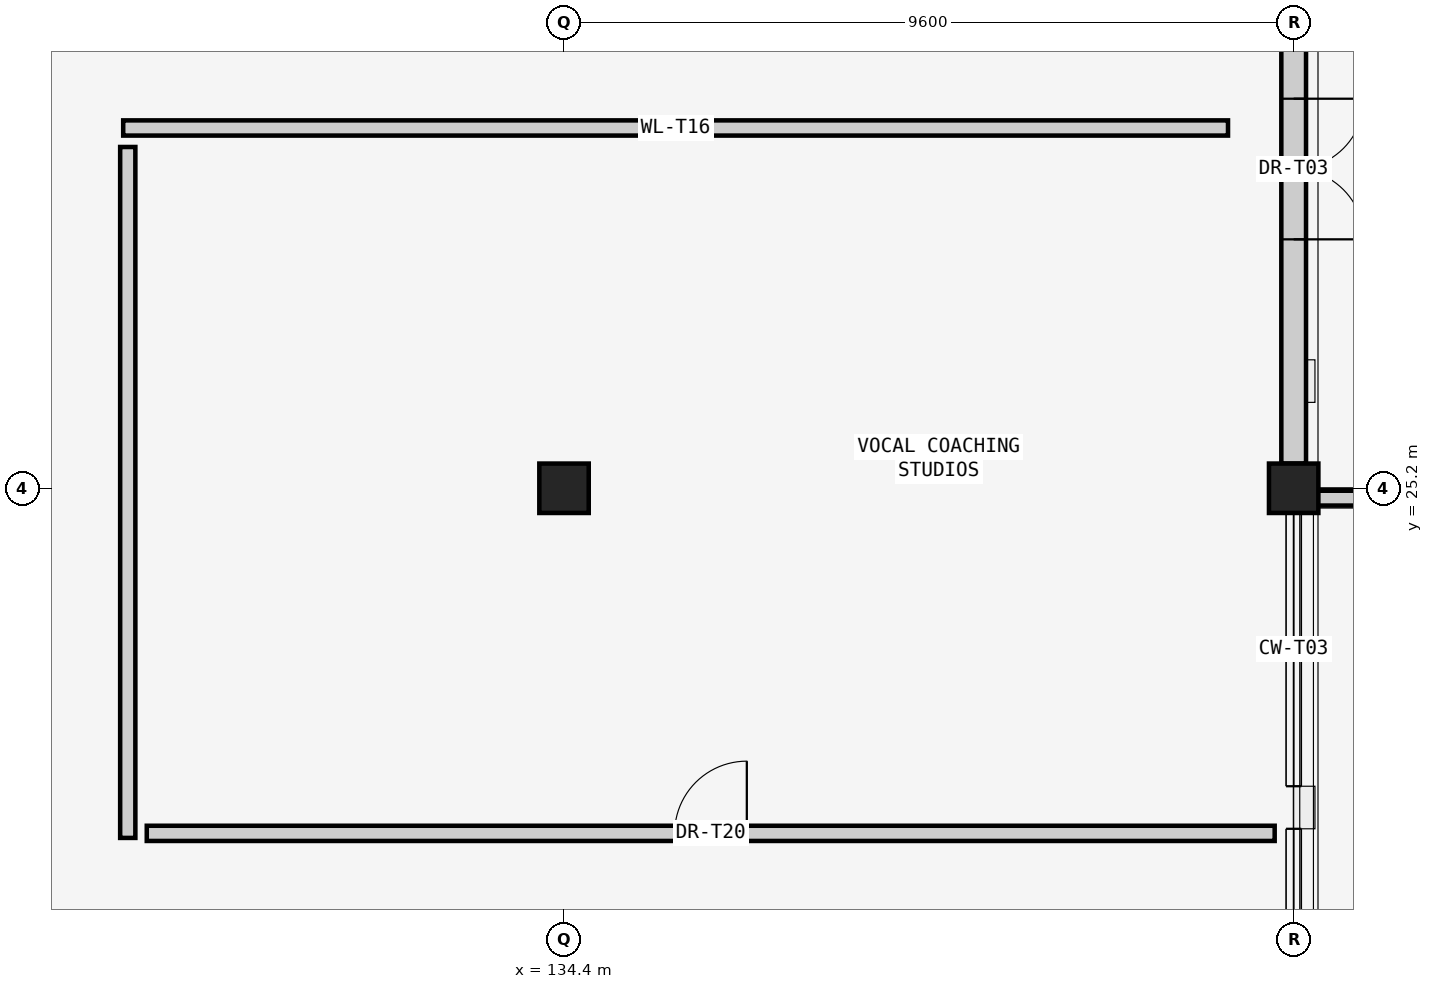
"""IFC4 building model, lengths in metres.
Left out: names, types, materials, properties, quantities, classifications, styles, units other than length and angle.
Written with IfcOpenShell. Run it as: python <this file> out.ifc"""

import sys

from ifc_helpers import new_model, si_unit, direction, frame, frame_2d, origin, origin_2d, place, context, subcontext, project, spatial, rectangle, extrude, element, fill, save


model = new_model("IFC4")
c1 = context("Model", 3, precision=1e-05, world=origin(), true_north=direction((0.0, 1.0)))
c2 = subcontext(c1, "Body", "Model", "MODEL_VIEW")
j1 = project(units=[si_unit("LENGTHUNIT", "METRE"), si_unit("PLANEANGLEUNIT", "RADIAN")], contexts=[c1])
p1 = place(None, origin())
s1 = spatial("IfcSite", under=j1, at=p1, CompositionType="ELEMENT")
p2 = place(p1, origin())
s2 = spatial("IfcBuilding", under=s1, at=p2, CompositionType="ELEMENT")
p3 = place(p2, frame((0.0, 0.0, 10.2)))
s3 = spatial("IfcBuildingStorey", under=s2, at=p3, CompositionType="ELEMENT", Elevation=10.2)
for number, where, z_axis, x_axis in (
    (1, (134.4, 25.2, 0.0), (0.0, 0.0, 1.0), (1.0, 0.0, 0.0)),
    (2, (144.0, 25.2, 0.0), (0.0, 0.0, 1.0), (1.0, 0.0, 0.0)),
):
    element("IfcColumn", number, at=place(p3, frame(where, z_axis=z_axis, x_axis=x_axis)), inside=s3, PredefinedType="COLUMN", context=c2, shape_type="SweptSolid", body=[
        extrude(rectangle(XDim=0.65, YDim=0.65, at=origin_2d()), origin(), (0.0, 0.0, 1.0), 4.53),
    ])
p4 = place(p3, frame((144.0, 33.275, 0.0), z_axis=(0.0, 0.0, 1.0), x_axis=(0.0, -1.0, 0.0)))
e3 = element("IfcWall", 3, at=p4, inside=s3, PredefinedType="SOLIDWALL", context=c2, shape_type="SweptSolid", body=[
    extrude(rectangle(XDim=7.75, YDim=0.325, at=frame_2d((3.875, 0.0))), origin(), (0.0, 0.0, 1.0), 4.178),
])
p5 = place(p4, frame((2.95, 0.0, 0.0)))
e4 = element("IfcOpeningElement", 4, at=p5, cuts=e3, PredefinedType="OPENING", context=c2, shape_type="SweptSolid", body=[
    extrude(rectangle(XDim=1.85, YDim=2.3, at=frame_2d((0.925, 1.15))), frame((0.0, 0.172, 0.0), z_axis=(0.0, -1.0, 0.0), x_axis=(1.0, 0.0, 0.0)), (0.0, 0.0, 1.0), 0.345),
])
p6 = place(p3, frame((144.16, 25.07, 0.0), z_axis=(0.0, 0.0, 1.0), x_axis=(1.0, 0.0, 0.0)))
e5 = element("IfcWall", 5, at=p6, inside=s3, PredefinedType="PARAPET", context=c2, shape_type="SweptSolid", body=[
    extrude(rectangle(XDim=9.28, YDim=0.195, at=frame_2d((4.64, 0.0))), origin(), (0.0, 0.0, 1.0), 1.15),
])
p7 = place(p3, frame((128.6, 29.94, 0.0), z_axis=(0.0, 0.0, 1.0), x_axis=(1.0, 0.0, 0.0)))
e6 = element("IfcWall", 6, at=p7, inside=s3, PredefinedType="SOLIDWALL", context=c2, shape_type="SweptSolid", body=[
    extrude(rectangle(XDim=14.536, YDim=0.2, at=frame_2d((7.268, 0.0))), origin(), (0.0, 0.0, 1.0), 4.48),
])
p8 = place(p3, frame((128.66, 20.6, 0.0), z_axis=(0.0, 0.0, 1.0), x_axis=(0.0, 1.0, 0.0)))
e7 = element("IfcWall", 7, at=p8, inside=s3, PredefinedType="SOLIDWALL", context=c2, shape_type="SweptSolid", body=[
    extrude(rectangle(XDim=9.09, YDim=0.2, at=frame_2d((4.545, 0.0))), origin(), (0.0, 0.0, 1.0), 4.48),
])
p9 = place(p3, frame((128.91, 20.66, 0.0), z_axis=(0.0, 0.0, 1.0), x_axis=(1.0, 0.0, 0.0)))
e8 = element("IfcWall", 8, at=p9, inside=s3, PredefinedType="SOLIDWALL", context=c2, shape_type="SweptSolid", body=[
    extrude(rectangle(XDim=14.84, YDim=0.2, at=frame_2d((7.42, 0.0))), origin(), (0.0, 0.0, 1.0), 4.48),
])
p10 = place(p9, frame((6.945, 0.0, 0.0)))
e9 = element("IfcOpeningElement", 9, at=p10, cuts=e8, PredefinedType="OPENING", context=c2, shape_type="SweptSolid", body=[
    extrude(rectangle(XDim=0.95, YDim=2.15, at=frame_2d((0.475, 1.075))), frame((0.0, 0.11, 0.0), z_axis=(0.0, -1.0, 0.0), x_axis=(1.0, 0.0, 0.0)), (0.0, 0.0, 1.0), 0.22),
])
p11 = place(p5, origin())
e10 = element("IfcDoor", 10, at=p11, inside=s3, OperationType="DOUBLE_DOOR_SINGLE_SWING", PredefinedType="DOOR", context=c2, shape_type="SweptSolid", body=[
    extrude(rectangle(XDim=1.85, YDim=2.3, at=frame_2d((0.925, 1.15))), frame((0.0, 0.025, 0.0), z_axis=(0.0, -1.0, 0.0), x_axis=(1.0, 0.0, 0.0)), (0.0, 0.0, 1.0), 0.05),
])
fill(e4, e10)
p12 = place(p10, origin())
e11 = element("IfcDoor", 11, at=p12, inside=s3, OperationType="SINGLE_SWING_RIGHT", PredefinedType="DOOR", context=c2, shape_type="SweptSolid", body=[
    extrude(rectangle(XDim=0.95, YDim=2.15, at=frame_2d((0.475, 1.075))), frame((0.0, 0.025, 0.0), z_axis=(0.0, -1.0, 0.0), x_axis=(1.0, 0.0, 0.0)), (0.0, 0.0, 1.0), 0.05),
])
fill(e9, e11)
save(model, sys.argv[1])
